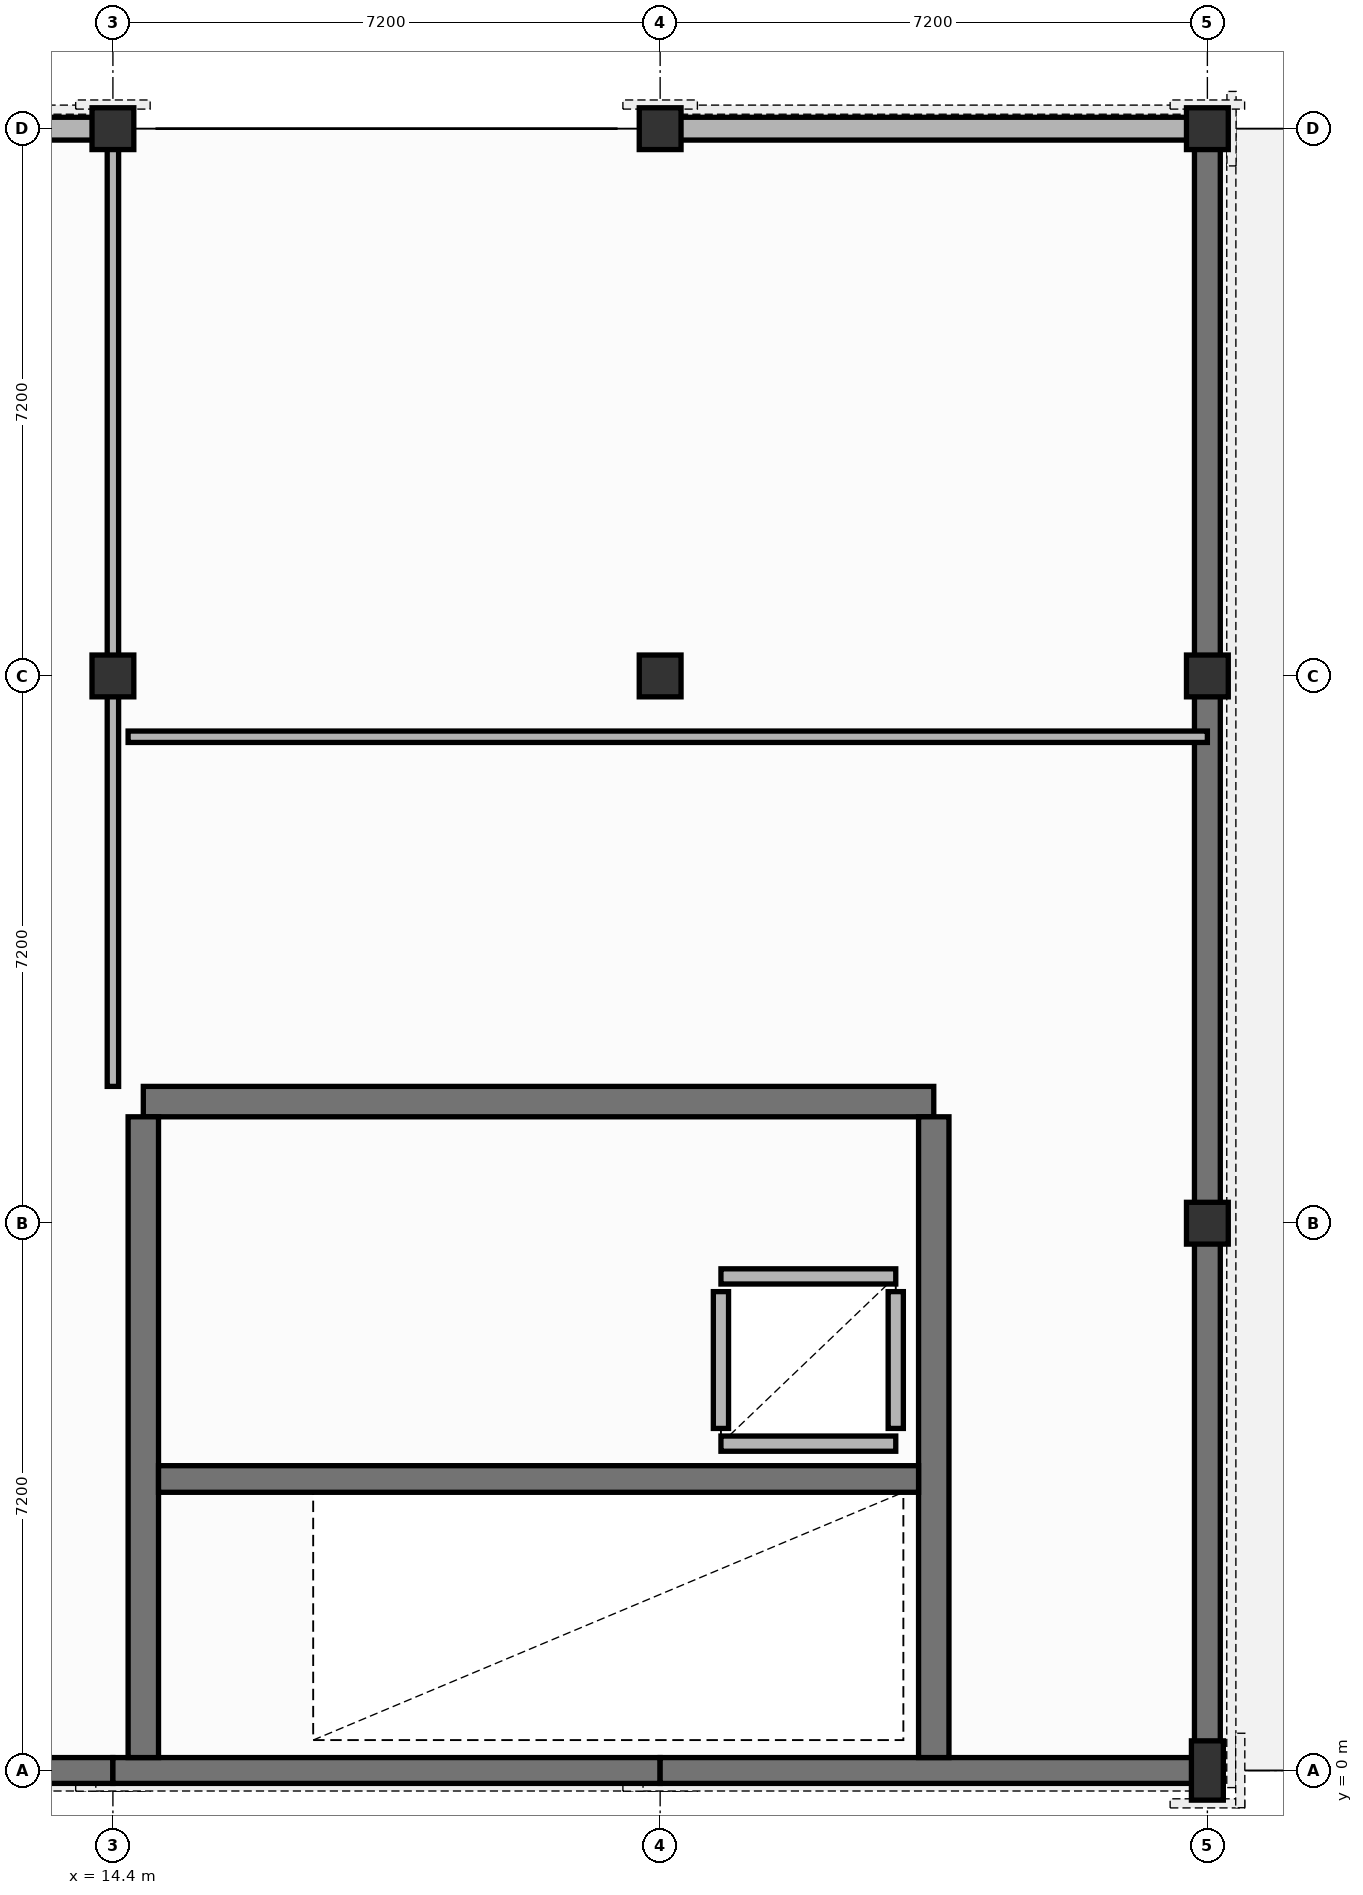
"""IFC4 building model, lengths in metres.
Left out: names, types, materials, properties, quantities, classifications, styles, units other than length and angle.
Written with IfcOpenShell. Run it as: python <this file> out.ifc"""

import sys

from ifc_helpers import new_model, si_unit, direction, frame, frame_2d, origin, origin_2d, place, context, subcontext, project, spatial, rectangle, extrude, element, fill, save


model = new_model("IFC4")
c1 = context("Model", 3, precision=1e-05, world=origin(), true_north=direction((0.0, 1.0)))
c2 = subcontext(c1, "Body", "Model", "MODEL_VIEW")
j1 = project(units=[si_unit("LENGTHUNIT", "METRE"), si_unit("PLANEANGLEUNIT", "RADIAN")], contexts=[c1])
p1 = place(None, origin())
s1 = spatial("IfcSite", under=j1, at=p1, CompositionType="ELEMENT")
p2 = place(p1, origin())
s2 = spatial("IfcBuilding", under=s1, at=p2, CompositionType="ELEMENT")
p3 = place(p2, frame((0.0, 0.0, 12.78)))
s3 = spatial("IfcBuildingStorey", under=s2, at=p3, CompositionType="ELEMENT", Elevation=12.78)
for number, where, z_axis, x_axis in (
    (1, (14.4, 14.4, 0.0), (0.0, 0.0, 1.0), (1.0, 0.0, 0.0)),
    (2, (14.4, 21.6, 0.0), (0.0, 0.0, 1.0), (1.0, 0.0, 0.0)),
    (3, (21.6, 14.4, 0.0), (0.0, 0.0, 1.0), (1.0, 0.0, 0.0)),
    (4, (21.6, 21.6, 0.0), (0.0, 0.0, 1.0), (1.0, 0.0, 0.0)),
):
    element("IfcColumn", number, at=place(p3, frame(where, z_axis=z_axis, x_axis=x_axis)), inside=s3, PredefinedType="COLUMN", context=c2, shape_type="SweptSolid", body=[
        extrude(rectangle(XDim=0.55, YDim=0.55, at=origin_2d()), origin(), (0.0, 0.0, 1.0), 3.74),
    ])
p4 = place(p3, frame((28.8, 0.0, 0.0), z_axis=(0.0, 0.0, 1.0), x_axis=(0.0, 1.0, 0.0)))
e5 = element("IfcColumn", 5, at=p4, inside=s3, PredefinedType="PILASTER", context=c2, shape_type="SweptSolid", body=[
    extrude(rectangle(XDim=0.42, YDim=0.78, at=origin_2d()), origin(), (0.0, 0.0, 1.0), 3.74),
])
for number, where, z_axis, x_axis in (
    (6, (28.8, 7.2, 0.0), (0.0, 0.0, 1.0), (1.0, 0.0, 0.0)),
    (7, (28.8, 14.4, 0.0), (0.0, 0.0, 1.0), (1.0, 0.0, 0.0)),
    (8, (28.8, 21.6, 0.0), (0.0, 0.0, 1.0), (1.0, 0.0, 0.0)),
):
    element("IfcColumn", number, at=place(p3, frame(where, z_axis=z_axis, x_axis=x_axis)), inside=s3, PredefinedType="COLUMN", context=c2, shape_type="SweptSolid", body=[
        extrude(rectangle(XDim=0.55, YDim=0.55, at=origin_2d()), origin(), (0.0, 0.0, 1.0), 3.74),
    ])
p5 = place(p3, frame((7.2, 0.0, 0.0), z_axis=(0.0, 0.0, 1.0), x_axis=(1.0, 0.0, 0.0)))
e9 = element("IfcWall", 9, at=p5, inside=s3, PredefinedType="SOLIDWALL", context=c2, shape_type="SweptSolid", body=[
    extrude(rectangle(XDim=7.2, YDim=0.34, at=frame_2d((3.6, 0.0))), origin(), (0.0, 0.0, 1.0), 3.42),
])
p6 = place(p5, frame((2.0, 0.0, 0.85)))
e10 = element("IfcOpeningElement", 10, at=p6, cuts=e9, PredefinedType="OPENING", context=c2, shape_type="SweptSolid", body=[
    extrude(rectangle(XDim=2.5, YDim=2.0, at=frame_2d((1.25, 1.0))), frame((0.0, 0.18, 0.0), z_axis=(0.0, -1.0, 0.0), x_axis=(1.0, 0.0, 0.0)), (0.0, 0.0, 1.0), 0.36),
])
p7 = place(p3, frame((14.4, 0.0, 0.0), z_axis=(0.0, 0.0, 1.0), x_axis=(1.0, 0.0, 0.0)))
e11 = element("IfcWall", 11, at=p7, inside=s3, PredefinedType="SOLIDWALL", context=c2, shape_type="SweptSolid", body=[
    extrude(rectangle(XDim=7.2, YDim=0.34, at=frame_2d((3.6, 0.0))), origin(), (0.0, 0.0, 1.0), 3.42),
])
p8 = place(p7, frame((5.2, 0.0, 1.05)))
e12 = element("IfcOpeningElement", 12, at=p8, cuts=e11, PredefinedType="OPENING", context=c2, shape_type="SweptSolid", body=[
    extrude(rectangle(XDim=1.05, YDim=1.75, at=frame_2d((0.525, 0.875))), frame((0.0, 0.18, 0.0), z_axis=(0.0, -1.0, 0.0), x_axis=(1.0, 0.0, 0.0)), (0.0, 0.0, 1.0), 0.36),
])
p9 = place(p3, frame((21.6, 0.0, 0.0), z_axis=(0.0, 0.0, 1.0), x_axis=(1.0, 0.0, 0.0)))
e13 = element("IfcWall", 13, at=p9, inside=s3, PredefinedType="SOLIDWALL", context=c2, shape_type="SweptSolid", body=[
    extrude(rectangle(XDim=7.2, YDim=0.34, at=frame_2d((3.6, 0.0))), origin(), (0.0, 0.0, 1.0), 3.42),
])
p10 = place(p9, frame((5.2, 0.0, 1.05)))
e14 = element("IfcOpeningElement", 14, at=p10, cuts=e13, PredefinedType="OPENING", context=c2, shape_type="SweptSolid", body=[
    extrude(rectangle(XDim=1.05, YDim=1.75, at=frame_2d((0.525, 0.875))), frame((0.0, 0.18, 0.0), z_axis=(0.0, -1.0, 0.0), x_axis=(1.0, 0.0, 0.0)), (0.0, 0.0, 1.0), 0.36),
])
p11 = place(p3, frame((28.8, 0.0, 0.0), z_axis=(0.0, 0.0, 1.0), x_axis=(0.0, 1.0, 0.0)))
e15 = element("IfcWall", 15, at=p11, inside=s3, PredefinedType="SOLIDWALL", context=c2, shape_type="SweptSolid", body=[
    extrude(rectangle(XDim=21.6, YDim=0.34, at=frame_2d((10.8, 0.0))), origin(), (0.0, 0.0, 1.0), 3.42),
])
p12 = place(p11, frame((10.2, 0.0, 0.0)))
e16 = element("IfcOpeningElement", 16, at=p12, cuts=e15, PredefinedType="OPENING", context=c2, shape_type="SweptSolid", body=[
    extrude(rectangle(XDim=1.05, YDim=2.2, at=frame_2d((0.525, 1.1))), frame((0.0, 0.18, 0.0), z_axis=(0.0, -1.0, 0.0), x_axis=(1.0, 0.0, 0.0)), (0.0, 0.0, 1.0), 0.36),
])
p13 = place(p11, frame((2.8, 0.0, 0.695)))
e17 = element("IfcOpeningElement", 17, at=p13, cuts=e15, PredefinedType="OPENING", context=c2, shape_type="SweptSolid", body=[
    extrude(rectangle(XDim=1.55, YDim=1.95, at=frame_2d((0.775, 0.975))), frame((0.0, 0.18, 0.0), z_axis=(0.0, -1.0, 0.0), x_axis=(1.0, 0.0, 0.0)), (0.0, 0.0, 1.0), 0.36),
])
p14 = place(p11, frame((15.2, 0.0, 0.595)))
e18 = element("IfcOpeningElement", 18, at=p14, cuts=e15, PredefinedType="OPENING", context=c2, shape_type="SweptSolid", body=[
    extrude(rectangle(XDim=1.6, YDim=2.05, at=frame_2d((0.8, 1.025))), frame((0.0, 0.18, 0.0), z_axis=(0.0, -1.0, 0.0), x_axis=(1.0, 0.0, 0.0)), (0.0, 0.0, 1.0), 0.36),
])
p15 = place(p3, frame((7.2, 21.6, 0.0), z_axis=(0.0, 0.0, 1.0), x_axis=(1.0, 0.0, 0.0)))
e19 = element("IfcWall", 19, at=p15, inside=s3, PredefinedType="SOLIDWALL", context=c2, shape_type="SweptSolid", body=[
    extrude(rectangle(XDim=7.2, YDim=0.3, at=frame_2d((3.6, 0.0))), origin(), (0.0, 0.0, 1.0), 2.805),
])
p16 = place(p15, frame((2.0, 0.0, 0.635)))
e20 = element("IfcOpeningElement", 20, at=p16, cuts=e19, PredefinedType="OPENING", context=c2, shape_type="SweptSolid", body=[
    extrude(rectangle(XDim=1.6, YDim=2.05, at=frame_2d((0.8, 1.025))), frame((0.0, 0.16, 0.0), z_axis=(0.0, -1.0, 0.0), x_axis=(1.0, 0.0, 0.0)), (0.0, 0.0, 1.0), 0.32),
])
p17 = place(p3, frame((21.6, 21.6, 0.0), z_axis=(0.0, 0.0, 1.0), x_axis=(1.0, 0.0, 0.0)))
e21 = element("IfcWall", 21, at=p17, inside=s3, PredefinedType="SOLIDWALL", context=c2, shape_type="SweptSolid", body=[
    extrude(rectangle(XDim=7.2, YDim=0.3, at=frame_2d((3.6, 0.0))), origin(), (0.0, 0.0, 1.0), 2.805),
])
p18 = place(p17, frame((2.0, 0.0, 0.635)))
e22 = element("IfcOpeningElement", 22, at=p18, cuts=e21, PredefinedType="OPENING", context=c2, shape_type="SweptSolid", body=[
    extrude(rectangle(XDim=1.6, YDim=2.05, at=frame_2d((0.8, 1.025))), frame((0.0, 0.16, 0.0), z_axis=(0.0, -1.0, 0.0), x_axis=(1.0, 0.0, 0.0)), (0.0, 0.0, 1.0), 0.32),
])
p19 = place(p3, frame((14.8, 8.8, 0.0), z_axis=(0.0, 0.0, 1.0), x_axis=(1.0, 0.0, 0.0)))
e23 = element("IfcWall", 23, at=p19, inside=s3, PredefinedType="SHEAR", context=c2, shape_type="SweptSolid", body=[
    extrude(rectangle(XDim=10.4, YDim=0.4, at=frame_2d((5.2, 0.0))), origin(), (0.0, 0.0, 1.0), 3.42),
])
p20 = place(p19, frame((2.4, 0.0, 0.0)))
e24 = element("IfcOpeningElement", 24, at=p20, cuts=e23, PredefinedType="OPENING", context=c2, shape_type="SweptSolid", body=[
    extrude(rectangle(XDim=1.5, YDim=2.2, at=frame_2d((0.75, 1.1))), frame((0.0, 0.21, 0.0), z_axis=(0.0, -1.0, 0.0), x_axis=(1.0, 0.0, 0.0)), (0.0, 0.0, 1.0), 0.42),
])
for number, where, z_axis, x_axis in (
    (25, (14.8, 0.17, 0.0), (0.0, 0.0, 1.0), (0.0, 1.0, 0.0)),
    (26, (25.2, 0.17, 0.0), (0.0, 0.0, 1.0), (0.0, 1.0, 0.0)),
):
    element("IfcWall", number, at=place(p3, frame(where, z_axis=z_axis, x_axis=x_axis)), inside=s3, PredefinedType="SHEAR", context=c2, shape_type="SweptSolid", body=[
        extrude(rectangle(XDim=8.43, YDim=0.4, at=frame_2d((4.215, 0.0))), origin(), (0.0, 0.0, 1.0), 3.42),
    ])
p21 = place(p3, frame((15.0, 3.835, 0.0), z_axis=(0.0, 0.0, 1.0), x_axis=(1.0, 0.0, 0.0)))
e27 = element("IfcWall", 27, at=p21, inside=s3, PredefinedType="SHEAR", context=c2, shape_type="SweptSolid", body=[
    extrude(rectangle(XDim=10.0, YDim=0.35, at=frame_2d((5.0, 0.0))), origin(), (0.0, 0.0, 1.0), 3.42),
])
p22 = place(p21, frame((0.45, 0.0, 0.0)))
e28 = element("IfcOpeningElement", 28, at=p22, cuts=e27, PredefinedType="OPENING", context=c2, shape_type="SweptSolid", body=[
    extrude(rectangle(XDim=1.05, YDim=2.2, at=frame_2d((0.525, 1.1))), frame((0.0, 0.185, 0.0), z_axis=(0.0, -1.0, 0.0), x_axis=(1.0, 0.0, 0.0)), (0.0, 0.0, 1.0), 0.37),
])
for number, where, z_axis, x_axis in (
    (29, (22.4, 4.3, 0.0), (0.0, 0.0, 1.0), (1.0, 0.0, 0.0)),
    (30, (22.4, 6.5, 0.0), (0.0, 0.0, 1.0), (1.0, 0.0, 0.0)),
):
    element("IfcWall", number, at=place(p3, frame(where, z_axis=z_axis, x_axis=x_axis)), inside=s3, PredefinedType="PARTITIONING", context=c2, shape_type="SweptSolid", body=[
        extrude(rectangle(XDim=2.3, YDim=0.2, at=frame_2d((1.15, 0.0))), origin(), (0.0, 0.0, 1.0), 3.42),
    ])
p23 = place(p3, frame((22.4, 4.5, 0.0), z_axis=(0.0, 0.0, 1.0), x_axis=(0.0, 1.0, 0.0)))
e31 = element("IfcWall", 31, at=p23, inside=s3, PredefinedType="PARTITIONING", context=c2, shape_type="SweptSolid", body=[
    extrude(rectangle(XDim=1.8, YDim=0.2, at=frame_2d((0.9, 0.0))), origin(), (0.0, 0.0, 1.0), 3.42),
])
p24 = place(p23, frame((0.45, 0.0, 0.0)))
e32 = element("IfcOpeningElement", 32, at=p24, cuts=e31, PredefinedType="OPENING", context=c2, shape_type="SweptSolid", body=[
    extrude(rectangle(XDim=0.9, YDim=2.1, at=frame_2d((0.45, 1.05))), frame((0.0, 0.11, 0.0), z_axis=(0.0, -1.0, 0.0), x_axis=(1.0, 0.0, 0.0)), (0.0, 0.0, 1.0), 0.22),
])
p25 = place(p3, frame((24.7, 4.5, 0.0), z_axis=(0.0, 0.0, 1.0), x_axis=(0.0, 1.0, 0.0)))
e33 = element("IfcWall", 33, at=p25, inside=s3, PredefinedType="PARTITIONING", context=c2, shape_type="SweptSolid", body=[
    extrude(rectangle(XDim=1.8, YDim=0.2, at=frame_2d((0.9, 0.0))), origin(), (0.0, 0.0, 1.0), 3.42),
])
p26 = place(p3, frame((14.4, 9.0, 0.0), z_axis=(0.0, 0.0, 1.0), x_axis=(0.0, 1.0, 0.0)))
e34 = element("IfcWall", 34, at=p26, inside=s3, PredefinedType="PARTITIONING", context=c2, shape_type="SweptSolid", body=[
    extrude(rectangle(XDim=12.6, YDim=0.15, at=frame_2d((6.3, 0.0))), origin(), (0.0, 0.0, 1.0), 2.685),
])
p27 = place(p26, frame((8.4, 0.0, 0.0)))
e35 = element("IfcOpeningElement", 35, at=p27, cuts=e34, PredefinedType="OPENING", context=c2, shape_type="SweptSolid", body=[
    extrude(rectangle(XDim=1.0, YDim=2.15, at=frame_2d((0.5, 1.075))), frame((0.0, 0.085, 0.0), z_axis=(0.0, -1.0, 0.0), x_axis=(1.0, 0.0, 0.0)), (0.0, 0.0, 1.0), 0.17),
])
p28 = place(p3, frame((14.6, 13.6, 0.0), z_axis=(0.0, 0.0, 1.0), x_axis=(1.0, 0.0, 0.0)))
e36 = element("IfcWall", 36, at=p28, inside=s3, PredefinedType="PARTITIONING", context=c2, shape_type="SweptSolid", body=[
    extrude(rectangle(XDim=14.2, YDim=0.15, at=frame_2d((7.1, 0.0))), origin(), (0.0, 0.0, 1.0), 3.42),
])
p29 = place(p28, frame((3.0, 0.0, 0.0)))
e37 = element("IfcOpeningElement", 37, at=p29, cuts=e36, PredefinedType="OPENING", context=c2, shape_type="SweptSolid", body=[
    extrude(rectangle(XDim=1.0, YDim=2.15, at=frame_2d((0.5, 1.075))), frame((0.0, 0.085, 0.0), z_axis=(0.0, -1.0, 0.0), x_axis=(1.0, 0.0, 0.0)), (0.0, 0.0, 1.0), 0.17),
])
p30 = place(p8, origin())
e38 = element("IfcWindow", 38, at=p30, inside=s3, PartitioningType="SINGLE_PANEL", PredefinedType="WINDOW", context=c2, shape_type="SweptSolid", body=[
    extrude(rectangle(XDim=1.05, YDim=1.75, at=frame_2d((0.525, 0.875))), frame((0.0, 0.03, 0.0), z_axis=(0.0, -1.0, 0.0), x_axis=(1.0, 0.0, 0.0)), (0.0, 0.0, 1.0), 0.06),
])
fill(e12, e38)
p31 = place(p10, origin())
e39 = element("IfcWindow", 39, at=p31, inside=s3, PartitioningType="SINGLE_PANEL", PredefinedType="WINDOW", context=c2, shape_type="SweptSolid", body=[
    extrude(rectangle(XDim=1.05, YDim=1.75, at=frame_2d((0.525, 0.875))), frame((0.0, 0.03, 0.0), z_axis=(0.0, -1.0, 0.0), x_axis=(1.0, 0.0, 0.0)), (0.0, 0.0, 1.0), 0.06),
])
fill(e14, e39)
p32 = place(p12, frame((1.05, 0.0, 0.0), z_axis=(0.0, 0.0, 1.0), x_axis=(-1.0, 0.0, 0.0)))
e40 = element("IfcDoor", 40, at=p32, inside=s3, OperationType="SINGLE_SWING_LEFT", PredefinedType="DOOR", context=c2, shape_type="SweptSolid", body=[
    extrude(rectangle(XDim=1.05, YDim=2.2, at=frame_2d((0.525, 1.1))), frame((0.0, 0.025, 0.0), z_axis=(0.0, -1.0, 0.0), x_axis=(1.0, 0.0, 0.0)), (0.0, 0.0, 1.0), 0.05),
])
fill(e16, e40)
p33 = place(p13, origin())
e41 = element("IfcWindow", 41, at=p33, inside=s3, PartitioningType="SINGLE_PANEL", PredefinedType="WINDOW", context=c2, shape_type="SweptSolid", body=[
    extrude(rectangle(XDim=1.55, YDim=1.95, at=frame_2d((0.775, 0.975))), frame((0.0, 0.03, 0.0), z_axis=(0.0, -1.0, 0.0), x_axis=(1.0, 0.0, 0.0)), (0.0, 0.0, 1.0), 0.06),
])
fill(e17, e41)
p34 = place(p14, origin())
e42 = element("IfcWindow", 42, at=p34, inside=s3, PartitioningType="SINGLE_PANEL", PredefinedType="WINDOW", context=c2, shape_type="SweptSolid", body=[
    extrude(rectangle(XDim=1.6, YDim=2.05, at=frame_2d((0.8, 1.025))), frame((0.0, 0.03, 0.0), z_axis=(0.0, -1.0, 0.0), x_axis=(1.0, 0.0, 0.0)), (0.0, 0.0, 1.0), 0.06),
])
fill(e18, e42)
p35 = place(p18, origin())
e43 = element("IfcWindow", 43, at=p35, inside=s3, PartitioningType="SINGLE_PANEL", PredefinedType="WINDOW", context=c2, shape_type="SweptSolid", body=[
    extrude(rectangle(XDim=1.6, YDim=2.05, at=frame_2d((0.8, 1.025))), frame((0.0, 0.03, 0.0), z_axis=(0.0, -1.0, 0.0), x_axis=(1.0, 0.0, 0.0)), (0.0, 0.0, 1.0), 0.06),
])
fill(e22, e43)
p36 = place(p20, origin())
e44 = element("IfcDoor", 44, at=p36, inside=s3, OperationType="DOUBLE_DOOR_SINGLE_SWING", PredefinedType="DOOR", context=c2, shape_type="SweptSolid", body=[
    extrude(rectangle(XDim=1.5, YDim=2.2, at=frame_2d((0.75, 1.1))), frame((0.0, 0.025, 0.0), z_axis=(0.0, -1.0, 0.0), x_axis=(1.0, 0.0, 0.0)), (0.0, 0.0, 1.0), 0.05),
])
fill(e24, e44)
p37 = place(p22, origin())
e45 = element("IfcDoor", 45, at=p37, inside=s3, OperationType="SINGLE_SWING_RIGHT", PredefinedType="DOOR", context=c2, shape_type="SweptSolid", body=[
    extrude(rectangle(XDim=1.05, YDim=2.2, at=frame_2d((0.525, 1.1))), frame((0.0, 0.025, 0.0), z_axis=(0.0, -1.0, 0.0), x_axis=(1.0, 0.0, 0.0)), (0.0, 0.0, 1.0), 0.05),
])
fill(e28, e45)
p38 = place(p24, origin())
e46 = element("IfcDoor", 46, at=p38, inside=s3, OperationType="SINGLE_SWING_LEFT", PredefinedType="DOOR", context=c2, shape_type="SweptSolid", body=[
    extrude(rectangle(XDim=0.9, YDim=2.1, at=frame_2d((0.45, 1.05))), frame((0.0, 0.025, 0.0), z_axis=(0.0, -1.0, 0.0), x_axis=(1.0, 0.0, 0.0)), (0.0, 0.0, 1.0), 0.05),
])
fill(e32, e46)
p39 = place(p27, origin())
e47 = element("IfcDoor", 47, at=p39, inside=s3, OperationType="SINGLE_SWING_LEFT", PredefinedType="DOOR", context=c2, shape_type="SweptSolid", body=[
    extrude(rectangle(XDim=1.0, YDim=2.15, at=frame_2d((0.5, 1.075))), frame((0.0, 0.025, 0.0), z_axis=(0.0, -1.0, 0.0), x_axis=(1.0, 0.0, 0.0)), (0.0, 0.0, 1.0), 0.05),
])
fill(e35, e47)
p40 = place(p29, origin())
e48 = element("IfcDoor", 48, at=p40, inside=s3, OperationType="SINGLE_SWING_RIGHT", PredefinedType="DOOR", context=c2, shape_type="SweptSolid", body=[
    extrude(rectangle(XDim=1.0, YDim=2.15, at=frame_2d((0.5, 1.075))), frame((0.0, 0.025, 0.0), z_axis=(0.0, -1.0, 0.0), x_axis=(1.0, 0.0, 0.0)), (0.0, 0.0, 1.0), 0.05),
])
fill(e37, e48)
save(model, sys.argv[1])
